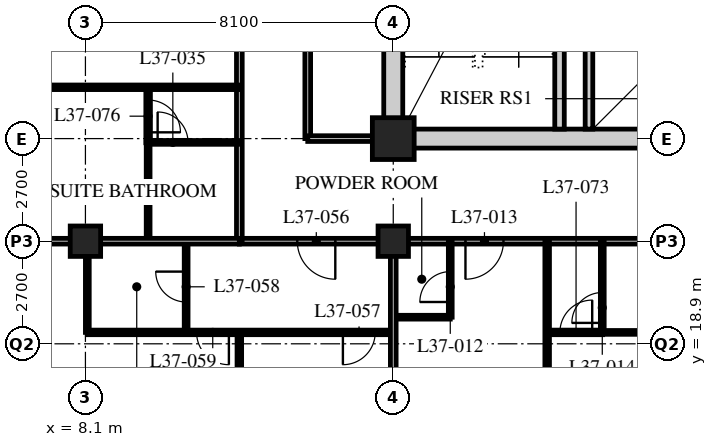
"""IFC4 building model, lengths in metres.
Left out: names, types, materials, properties, quantities, classifications, styles, units other than length and angle.
Written with IfcOpenShell. Run it as: python <this file> out.ifc"""

import sys

from ifc_helpers import new_model, si_unit, direction, frame, frame_2d, origin, origin_2d, place, context, subcontext, project, spatial, rectangle, hollow_rectangle, extrude, element, fill, save


model = new_model("IFC4")
c1 = context("Model", 3, precision=1e-05, world=origin(), true_north=direction((0.0, 1.0)))
c2 = subcontext(c1, "Body", "Model", "MODEL_VIEW")
j1 = project(units=[si_unit("LENGTHUNIT", "METRE"), si_unit("PLANEANGLEUNIT", "RADIAN")], contexts=[c1])
p1 = place(None, origin())
s1 = spatial("IfcSite", under=j1, at=p1, CompositionType="ELEMENT")
p2 = place(p1, origin())
s2 = spatial("IfcBuilding", under=s1, at=p2, CompositionType="ELEMENT")
p3 = place(p2, frame((0.0, 0.0, 144.2)))
s3 = spatial("IfcBuildingStorey", under=s2, at=p3, CompositionType="ELEMENT", Elevation=144.2)
for number, where, z_axis, x_axis in (
    (1, (8.1, 21.6, 0.0), (0.0, 0.0, 1.0), (1.0, 0.0, 0.0)),
    (2, (16.2, 21.6, 0.0), (0.0, 0.0, 1.0), (1.0, 0.0, 0.0)),
):
    element("IfcColumn", number, at=place(p3, frame(where, z_axis=z_axis, x_axis=x_axis)), inside=s3, PredefinedType="COLUMN", context=c2, shape_type="SweptSolid", body=[
        extrude(hollow_rectangle(XDim=0.8, YDim=0.8, WallThickness=0.08, at=origin_2d()), origin(), (0.0, 0.0, 1.0), 3.4),
    ])
p4 = place(p3, frame((16.2, 24.3, 0.0), z_axis=(0.0, 0.0, 1.0), x_axis=(1.0, 0.0, 0.0)))
e3 = element("IfcColumn", 3, at=p4, inside=s3, PredefinedType="COLUMN", context=c2, shape_type="SweptSolid", body=[
    extrude(hollow_rectangle(XDim=1.1, YDim=1.1, WallThickness=0.1, at=origin_2d()), origin(), (0.0, 0.0, 1.0), 3.4),
])
p5 = place(p3, frame((12.15, 21.6, 0.0), z_axis=(0.0, 0.0, 1.0), x_axis=(1.0, 0.0, 0.0)))
e4 = element("IfcWall", 4, at=p5, inside=s3, PredefinedType="PARTITIONING", context=c2, shape_type="SweptSolid", body=[
    extrude(rectangle(XDim=36.45, YDim=0.15, at=frame_2d((18.225, 0.0))), origin(), (0.0, 0.0, 1.0), 2.42),
])
p6 = place(p5, frame((5.95, 0.0, 0.0)))
e5 = element("IfcOpeningElement", 5, at=p6, cuts=e4, PredefinedType="OPENING", context=c2, shape_type="SweptSolid", body=[
    extrude(rectangle(XDim=1.0, YDim=2.1, at=frame_2d((0.5, 1.05))), frame((0.0, 0.085, 0.0), z_axis=(0.0, -1.0, 0.0), x_axis=(1.0, 0.0, 0.0)), (0.0, 0.0, 1.0), 0.17),
])
p7 = place(p5, frame((14.05, 0.0, 0.0)))
e6 = element("IfcOpeningElement", 6, at=p7, cuts=e4, PredefinedType="OPENING", context=c2, shape_type="SweptSolid", body=[
    extrude(rectangle(XDim=1.0, YDim=2.1, at=frame_2d((0.5, 1.05))), frame((0.0, 0.085, 0.0), z_axis=(0.0, -1.0, 0.0), x_axis=(1.0, 0.0, 0.0)), (0.0, 0.0, 1.0), 0.17),
])
p8 = place(p5, frame((22.15, 0.0, 0.0)))
e7 = element("IfcOpeningElement", 7, at=p8, cuts=e4, PredefinedType="OPENING", context=c2, shape_type="SweptSolid", body=[
    extrude(rectangle(XDim=1.0, YDim=2.1, at=frame_2d((0.5, 1.05))), frame((0.0, 0.085, 0.0), z_axis=(0.0, -1.0, 0.0), x_axis=(1.0, 0.0, 0.0)), (0.0, 0.0, 1.0), 0.17),
])
p9 = place(p5, frame((30.8, 0.0, 0.0)))
e8 = element("IfcOpeningElement", 8, at=p9, cuts=e4, PredefinedType="OPENING", context=c2, shape_type="SweptSolid", body=[
    extrude(rectangle(XDim=1.0, YDim=2.1, at=frame_2d((0.5, 1.05))), frame((0.0, 0.085, 0.0), z_axis=(0.0, -1.0, 0.0), x_axis=(1.0, 0.0, 0.0)), (0.0, 0.0, 1.0), 0.17),
])
p10 = place(p5, frame((1.525, 0.0, 0.0)))
e9 = element("IfcOpeningElement", 9, at=p10, cuts=e4, PredefinedType="OPENING", context=c2, shape_type="SweptSolid", body=[
    extrude(rectangle(XDim=1.0, YDim=2.1, at=frame_2d((0.5, 1.05))), frame((0.0, 0.085, 0.0), z_axis=(0.0, -1.0, 0.0), x_axis=(1.0, 0.0, 0.0)), (0.0, 0.0, 1.0), 0.17),
])
p11 = place(p5, frame((33.925, 0.0, 0.0)))
e10 = element("IfcOpeningElement", 10, at=p11, cuts=e4, PredefinedType="OPENING", context=c2, shape_type="SweptSolid", body=[
    extrude(rectangle(XDim=1.0, YDim=2.1, at=frame_2d((0.5, 1.05))), frame((0.0, 0.085, 0.0), z_axis=(0.0, -1.0, 0.0), x_axis=(1.0, 0.0, 0.0)), (0.0, 0.0, 1.0), 0.17),
])
p12 = place(p3, frame((12.15, 21.6, 0.0), z_axis=(0.0, 0.0, 1.0), x_axis=(0.0, 1.0, 0.0)))
e11 = element("IfcWall", 11, at=p12, inside=s3, PredefinedType="PARTITIONING", context=c2, shape_type="SweptSolid", body=[
    extrude(rectangle(XDim=24.3, YDim=0.15, at=frame_2d((12.15, 0.0))), origin(), (0.0, 0.0, 1.0), 3.19),
])
p13 = place(p12, frame((5.575, 0.0, 0.0)))
e12 = element("IfcOpeningElement", 12, at=p13, cuts=e11, PredefinedType="OPENING", context=c2, shape_type="SweptSolid", body=[
    extrude(rectangle(XDim=1.0, YDim=2.1, at=frame_2d((0.5, 1.05))), frame((0.0, 0.085, 0.0), z_axis=(0.0, -1.0, 0.0), x_axis=(1.0, 0.0, 0.0)), (0.0, 0.0, 1.0), 0.17),
])
p14 = place(p12, frame((14.05, 0.0, 0.0)))
e13 = element("IfcOpeningElement", 13, at=p14, cuts=e11, PredefinedType="OPENING", context=c2, shape_type="SweptSolid", body=[
    extrude(rectangle(XDim=1.0, YDim=2.1, at=frame_2d((0.5, 1.05))), frame((0.0, 0.085, 0.0), z_axis=(0.0, -1.0, 0.0), x_axis=(1.0, 0.0, 0.0)), (0.0, 0.0, 1.0), 0.17),
])
p15 = place(p12, frame((22.7, 0.0, 0.0)))
e14 = element("IfcOpeningElement", 14, at=p15, cuts=e11, PredefinedType="OPENING", context=c2, shape_type="SweptSolid", body=[
    extrude(rectangle(XDim=1.0, YDim=2.1, at=frame_2d((0.5, 1.05))), frame((0.0, 0.085, 0.0), z_axis=(0.0, -1.0, 0.0), x_axis=(1.0, 0.0, 0.0)), (0.0, 0.0, 1.0), 0.17),
])
p16 = place(p3, frame((13.95, 44.1, 0.0), z_axis=(0.0, 0.0, 1.0), x_axis=(0.0, -1.0, 0.0)))
e15 = element("IfcWall", 15, at=p16, inside=s3, PredefinedType="PARTITIONING", context=c2, shape_type="SweptSolid", body=[
    extrude(rectangle(XDim=19.8, YDim=0.15, at=frame_2d((9.9, 0.0))), origin(), (0.0, 0.0, 1.0), 3.19),
])
p17 = place(p16, frame((15.25, 0.0, 0.0)))
e16 = element("IfcOpeningElement", 16, at=p17, cuts=e15, PredefinedType="OPENING", context=c2, shape_type="SweptSolid", body=[
    extrude(rectangle(XDim=1.0, YDim=2.1, at=frame_2d((0.5, 1.05))), frame((0.0, 0.085, 0.0), z_axis=(0.0, -1.0, 0.0), x_axis=(1.0, 0.0, 0.0)), (0.0, 0.0, 1.0), 0.17),
])
p18 = place(p16, frame((7.15, 0.0, 0.0)))
e17 = element("IfcOpeningElement", 17, at=p18, cuts=e15, PredefinedType="OPENING", context=c2, shape_type="SweptSolid", body=[
    extrude(rectangle(XDim=1.0, YDim=2.1, at=frame_2d((0.5, 1.05))), frame((0.0, 0.085, 0.0), z_axis=(0.0, -1.0, 0.0), x_axis=(1.0, 0.0, 0.0)), (0.0, 0.0, 1.0), 0.17),
])
p19 = place(p3, frame((13.95, 24.3, 0.0), z_axis=(0.0, 0.0, 1.0), x_axis=(1.0, 0.0, 0.0)))
e18 = element("IfcWall", 18, at=p19, inside=s3, PredefinedType="PARTITIONING", context=c2, shape_type="SweptSolid", body=[
    extrude(rectangle(XDim=2.05, YDim=0.15, at=frame_2d((1.025, 0.0))), origin(), (0.0, 0.0, 1.0), 3.19),
])
p20 = place(p3, frame((16.2, 19.6, 0.0), z_axis=(0.0, 0.0, 1.0), x_axis=(1.0, 0.0, 0.0)))
e19 = element("IfcWall", 19, at=p20, inside=s3, PredefinedType="PARTITIONING", context=c2, shape_type="SweptSolid", body=[
    extrude(rectangle(XDim=1.5, YDim=0.1, at=frame_2d((0.75, 0.0))), origin(), (0.0, 0.0, 1.0), 3.19),
])
p21 = place(p3, frame((17.7, 21.6, 0.0), z_axis=(0.0, 0.0, 1.0), x_axis=(0.0, -1.0, 0.0)))
e20 = element("IfcWall", 20, at=p21, inside=s3, PredefinedType="PARTITIONING", context=c2, shape_type="SweptSolid", body=[
    extrude(rectangle(XDim=2.0, YDim=0.1, at=frame_2d((1.0, 0.0))), origin(), (0.0, 0.0, 1.0), 3.19),
])
p22 = place(p21, frame((0.8, 0.0, 0.0)))
e21 = element("IfcOpeningElement", 21, at=p22, cuts=e20, PredefinedType="OPENING", context=c2, shape_type="SweptSolid", body=[
    extrude(rectangle(XDim=0.8, YDim=2.1, at=frame_2d((0.4, 1.05))), frame((0.0, 0.06, 0.0), z_axis=(0.0, -1.0, 0.0), x_axis=(1.0, 0.0, 0.0)), (0.0, 0.0, 1.0), 0.12),
])
p23 = place(p3, frame((21.7, 19.2, 0.0), z_axis=(0.0, 0.0, 1.0), x_axis=(1.0, 0.0, 0.0)))
e22 = element("IfcWall", 22, at=p23, inside=s3, PredefinedType="PARTITIONING", context=c2, shape_type="SweptSolid", body=[
    extrude(rectangle(XDim=2.6, YDim=0.1, at=frame_2d((1.3, 0.0))), origin(), (0.0, 0.0, 1.0), 3.19),
])
p24 = place(p3, frame((21.7, 21.6, 0.0), z_axis=(0.0, 0.0, 1.0), x_axis=(0.0, -1.0, 0.0)))
e23 = element("IfcWall", 23, at=p24, inside=s3, PredefinedType="PARTITIONING", context=c2, shape_type="SweptSolid", body=[
    extrude(rectangle(XDim=2.4, YDim=0.1, at=frame_2d((1.2, 0.0))), origin(), (0.0, 0.0, 1.0), 3.19),
])
p25 = place(p24, frame((1.35, 0.0, 0.0)))
e24 = element("IfcOpeningElement", 24, at=p25, cuts=e23, PredefinedType="OPENING", context=c2, shape_type="SweptSolid", body=[
    extrude(rectangle(XDim=0.8, YDim=2.1, at=frame_2d((0.4, 1.05))), frame((0.0, 0.06, 0.0), z_axis=(0.0, -1.0, 0.0), x_axis=(1.0, 0.0, 0.0)), (0.0, 0.0, 1.0), 0.12),
])
p26 = place(p3, frame((20.25, 21.6, 0.0), z_axis=(0.0, 0.0, 1.0), x_axis=(0.0, -1.0, 0.0)))
e25 = element("IfcWall", 25, at=p26, inside=s3, PredefinedType="PARTITIONING", context=c2, shape_type="SweptSolid", body=[
    extrude(rectangle(XDim=15.9, YDim=0.12, at=frame_2d((7.95, 0.0))), origin(), (0.0, 0.0, 1.0), 3.19),
])
p27 = place(p26, frame((8.875, 0.0, 0.0)))
e26 = element("IfcOpeningElement", 26, at=p27, cuts=e25, PredefinedType="OPENING", context=c2, shape_type="SweptSolid", body=[
    extrude(rectangle(XDim=0.85, YDim=2.1, at=frame_2d((0.425, 1.05))), frame((0.0, 0.07, 0.0), z_axis=(0.0, -1.0, 0.0), x_axis=(1.0, 0.0, 0.0)), (0.0, 0.0, 1.0), 0.14),
])
p28 = place(p3, frame((9.75, 21.6, 0.0), z_axis=(0.0, 0.0, 1.0), x_axis=(0.0, 1.0, 0.0)))
e27 = element("IfcWall", 27, at=p28, inside=s3, PredefinedType="PARTITIONING", context=c2, shape_type="SweptSolid", body=[
    extrude(rectangle(XDim=2.6, YDim=0.1, at=frame_2d((1.3, 0.0))), origin(), (0.0, 0.0, 1.0), 3.19),
])
p29 = place(p3, frame((12.15, 24.2, 0.0), z_axis=(0.0, 0.0, 1.0), x_axis=(-1.0, 0.0, 0.0)))
e28 = element("IfcWall", 28, at=p29, inside=s3, PredefinedType="PARTITIONING", context=c2, shape_type="SweptSolid", body=[
    extrude(rectangle(XDim=2.4, YDim=0.1, at=frame_2d((1.2, 0.0))), origin(), (0.0, 0.0, 1.0), 3.19),
])
p30 = place(p29, frame((1.35, 0.0, 0.0)))
e29 = element("IfcOpeningElement", 29, at=p30, cuts=e28, PredefinedType="OPENING", context=c2, shape_type="SweptSolid", body=[
    extrude(rectangle(XDim=0.8, YDim=2.1, at=frame_2d((0.4, 1.05))), frame((0.0, 0.06, 0.0), z_axis=(0.0, -1.0, 0.0), x_axis=(1.0, 0.0, 0.0)), (0.0, 0.0, 1.0), 0.12),
])
p31 = place(p3, frame((12.15, 25.65, 0.0), z_axis=(0.0, 0.0, 1.0), x_axis=(-1.0, 0.0, 0.0)))
e30 = element("IfcWall", 30, at=p31, inside=s3, PredefinedType="PARTITIONING", context=c2, shape_type="SweptSolid", body=[
    extrude(rectangle(XDim=11.85, YDim=0.12, at=frame_2d((5.925, 0.0))), origin(), (0.0, 0.0, 1.0), 3.19),
])
p32 = place(p31, frame((6.85, 0.0, 0.0)))
e31 = element("IfcOpeningElement", 31, at=p32, cuts=e30, PredefinedType="OPENING", context=c2, shape_type="SweptSolid", body=[
    extrude(rectangle(XDim=0.85, YDim=2.1, at=frame_2d((0.425, 1.05))), frame((0.0, 0.07, 0.0), z_axis=(0.0, -1.0, 0.0), x_axis=(1.0, 0.0, 0.0)), (0.0, 0.0, 1.0), 0.14),
])
p33 = place(p3, frame((10.75, 21.6, 0.0), z_axis=(0.0, 0.0, 1.0), x_axis=(0.0, -1.0, 0.0)))
e32 = element("IfcWall", 32, at=p33, inside=s3, PredefinedType="PARTITIONING", context=c2, shape_type="SweptSolid", body=[
    extrude(rectangle(XDim=2.4, YDim=0.1, at=frame_2d((1.2, 0.0))), origin(), (0.0, 0.0, 1.0), 3.19),
])
p34 = place(p33, frame((0.8, 0.0, 0.0)))
e33 = element("IfcOpeningElement", 33, at=p34, cuts=e32, PredefinedType="OPENING", context=c2, shape_type="SweptSolid", body=[
    extrude(rectangle(XDim=0.8, YDim=2.1, at=frame_2d((0.4, 1.05))), frame((0.0, 0.06, 0.0), z_axis=(0.0, -1.0, 0.0), x_axis=(1.0, 0.0, 0.0)), (0.0, 0.0, 1.0), 0.12),
])
p35 = place(p3, frame((8.15, 21.6, 0.0), z_axis=(0.0, 0.0, 1.0), x_axis=(0.0, -1.0, 0.0)))
e34 = element("IfcWall", 34, at=p35, inside=s3, PredefinedType="PARTITIONING", context=c2, shape_type="SweptSolid", body=[
    extrude(rectangle(XDim=2.4, YDim=0.1, at=frame_2d((1.2, 0.0))), origin(), (0.0, 0.0, 1.0), 2.42),
])
p36 = place(p3, frame((8.15, 19.2, 0.0), z_axis=(0.0, 0.0, 1.0), x_axis=(1.0, 0.0, 0.0)))
e35 = element("IfcWall", 35, at=p36, inside=s3, PredefinedType="PARTITIONING", context=c2, shape_type="SweptSolid", body=[
    extrude(rectangle(XDim=8.05, YDim=0.12, at=frame_2d((4.025, 0.0))), origin(), (0.0, 0.0, 1.0), 3.19),
])
p37 = place(p36, frame((6.725, 0.0, 0.0)))
e36 = element("IfcOpeningElement", 36, at=p37, cuts=e35, PredefinedType="OPENING", context=c2, shape_type="SweptSolid", body=[
    extrude(rectangle(XDim=0.85, YDim=2.1, at=frame_2d((0.425, 1.05))), frame((0.0, 0.07, 0.0), z_axis=(0.0, -1.0, 0.0), x_axis=(1.0, 0.0, 0.0)), (0.0, 0.0, 1.0), 0.14),
])
p38 = place(p36, frame((2.875, 0.0, 0.0)))
e37 = element("IfcOpeningElement", 37, at=p38, cuts=e35, PredefinedType="OPENING", context=c2, shape_type="SweptSolid", body=[
    extrude(rectangle(XDim=0.85, YDim=2.1, at=frame_2d((0.425, 1.05))), frame((0.0, 0.07, 0.0), z_axis=(0.0, -1.0, 0.0), x_axis=(1.0, 0.0, 0.0)), (0.0, 0.0, 1.0), 0.14),
])
p39 = place(p3, frame((12.15, 19.2, 0.0), z_axis=(0.0, 0.0, 1.0), x_axis=(0.0, -1.0, 0.0)))
e38 = element("IfcWall", 38, at=p39, inside=s3, PredefinedType="PARTITIONING", context=c2, shape_type="SweptSolid", body=[
    extrude(rectangle(XDim=13.5, YDim=0.12, at=frame_2d((6.75, 0.0))), origin(), (0.0, 0.0, 1.0), 3.19),
])
p40 = place(p3, frame((0.3, 21.6, 0.0), z_axis=(0.0, 0.0, 1.0), x_axis=(1.0, 0.0, 0.0)))
e39 = element("IfcWall", 39, at=p40, inside=s3, PredefinedType="PARTITIONING", context=c2, shape_type="SweptSolid", body=[
    extrude(rectangle(XDim=11.85, YDim=0.15, at=frame_2d((5.925, 0.0))), origin(), (0.0, 0.0, 1.0), 2.42),
])
p41 = place(p3, frame((16.2, 21.6, 0.0), z_axis=(0.0, 0.0, 1.0), x_axis=(0.0, -1.0, 0.0)))
e40 = element("IfcWall", 40, at=p41, inside=s3, PredefinedType="PARTITIONING", context=c2, shape_type="SweptSolid", body=[
    extrude(rectangle(XDim=15.9, YDim=0.15, at=frame_2d((7.95, 0.0))), origin(), (0.0, 0.0, 1.0), 2.42),
])
p42 = place(p3, frame((21.71, 19.2, 0.0), z_axis=(0.0, 0.0, 1.0), x_axis=(-1.0, 0.0, 0.0)))
e41 = element("IfcWall", 41, at=p42, inside=s3, PredefinedType="PARTITIONING", context=c2, shape_type="SweptSolid", body=[
    extrude(rectangle(XDim=1.46, YDim=0.12, at=frame_2d((0.73, 0.0))), origin(), (0.0, 0.0, 1.0), 3.19),
])
p43 = place(p42, frame((0.275, 0.0, 0.0)))
e42 = element("IfcOpeningElement", 42, at=p43, cuts=e41, PredefinedType="OPENING", context=c2, shape_type="SweptSolid", body=[
    extrude(rectangle(XDim=0.85, YDim=2.1, at=frame_2d((0.425, 1.05))), frame((0.0, 0.07, 0.0), z_axis=(0.0, -1.0, 0.0), x_axis=(1.0, 0.0, 0.0)), (0.0, 0.0, 1.0), 0.14),
])
p44 = place(p3, frame((9.75, 24.19, 0.0), z_axis=(0.0, 0.0, 1.0), x_axis=(0.0, 1.0, 0.0)))
e43 = element("IfcWall", 43, at=p44, inside=s3, PredefinedType="PARTITIONING", context=c2, shape_type="SweptSolid", body=[
    extrude(rectangle(XDim=1.46, YDim=0.12, at=frame_2d((0.73, 0.0))), origin(), (0.0, 0.0, 1.0), 3.19),
])
p45 = place(p44, frame((0.275, 0.0, 0.0)))
e44 = element("IfcOpeningElement", 44, at=p45, cuts=e43, PredefinedType="OPENING", context=c2, shape_type="SweptSolid", body=[
    extrude(rectangle(XDim=0.85, YDim=2.1, at=frame_2d((0.425, 1.05))), frame((0.0, 0.07, 0.0), z_axis=(0.0, -1.0, 0.0), x_axis=(1.0, 0.0, 0.0)), (0.0, 0.0, 1.0), 0.14),
])
p46 = place(p3, frame((15.95, 24.3, 0.0), z_axis=(0.0, 0.0, 1.0), x_axis=(1.0, 0.0, 0.0)))
e45 = element("IfcWall", 45, at=p46, inside=s3, PredefinedType="SOLIDWALL", context=c2, shape_type="SweptSolid", body=[
    extrude(rectangle(XDim=24.8, YDim=0.5, at=frame_2d((12.4, 0.0))), origin(), (0.0, 0.0, 1.0), 2.42),
])
p47 = place(p46, frame((11.5, 0.0, 0.0)))
e46 = element("IfcOpeningElement", 46, at=p47, cuts=e45, PredefinedType="OPENING", context=c2, shape_type="SweptSolid", body=[
    extrude(rectangle(XDim=1.8, YDim=2.4, at=frame_2d((0.9, 1.2))), frame((0.0, 0.26, 0.0), z_axis=(0.0, -1.0, 0.0), x_axis=(1.0, 0.0, 0.0)), (0.0, 0.0, 1.0), 0.52),
])
p48 = place(p3, frame((16.2, 24.55, 0.0), z_axis=(0.0, 0.0, 1.0), x_axis=(0.0, 1.0, 0.0)))
e47 = element("IfcWall", 47, at=p48, inside=s3, PredefinedType="SOLIDWALL", context=c2, shape_type="SweptSolid", body=[
    extrude(rectangle(XDim=15.7, YDim=0.5, at=frame_2d((7.85, 0.0))), origin(), (0.0, 0.0, 1.0), 2.42),
])
p49 = place(p3, frame((20.575, 24.55, 0.0), z_axis=(0.0, 0.0, 1.0), x_axis=(0.0, 1.0, 0.0)))
e48 = element("IfcWall", 48, at=p49, inside=s3, PredefinedType="SOLIDWALL", context=c2, shape_type="SweptSolid", body=[
    extrude(rectangle(XDim=7.75, YDim=0.25, at=frame_2d((3.875, 0.0))), origin(), (0.0, 0.0, 1.0), 3.19),
])
p50 = place(p49, frame((6.2, 0.0, 0.0)))
e49 = element("IfcOpeningElement", 49, at=p50, cuts=e48, PredefinedType="OPENING", context=c2, shape_type="SweptSolid", body=[
    extrude(rectangle(XDim=1.2, YDim=2.1, at=frame_2d((0.6, 1.05))), frame((0.0, 0.135, 0.0), z_axis=(0.0, -1.0, 0.0), x_axis=(1.0, 0.0, 0.0)), (0.0, 0.0, 1.0), 0.27),
])
p51 = place(p3, frame((21.35, 24.55, 0.0), z_axis=(0.0, 0.0, 1.0), x_axis=(0.0, 1.0, 0.0)))
e50 = element("IfcWall", 50, at=p51, inside=s3, PredefinedType="SOLIDWALL", context=c2, shape_type="SweptSolid", body=[
    extrude(rectangle(XDim=2.6, YDim=0.2, at=frame_2d((1.3, 0.0))), origin(), (0.0, 0.0, 1.0), 3.19),
])
p52 = place(p22, origin())
e51 = element("IfcDoor", 51, at=p52, inside=s3, OperationType="SINGLE_SWING_LEFT", PredefinedType="DOOR", context=c2, shape_type="SweptSolid", body=[
    extrude(rectangle(XDim=0.8, YDim=2.1, at=frame_2d((0.4, 1.05))), frame((0.0, 0.025, 0.0), z_axis=(0.0, -1.0, 0.0), x_axis=(1.0, 0.0, 0.0)), (0.0, 0.0, 1.0), 0.05),
])
fill(e21, e51)
p53 = place(p6, origin())
e52 = element("IfcDoor", 52, at=p53, inside=s3, OperationType="SINGLE_SWING_RIGHT", PredefinedType="DOOR", context=c2, shape_type="SweptSolid", body=[
    extrude(rectangle(XDim=1.0, YDim=2.1, at=frame_2d((0.5, 1.05))), frame((0.0, 0.025, 0.0), z_axis=(0.0, -1.0, 0.0), x_axis=(1.0, 0.0, 0.0)), (0.0, 0.0, 1.0), 0.05),
])
fill(e5, e52)
p54 = place(p25, origin())
e53 = element("IfcDoor", 53, at=p54, inside=s3, OperationType="SINGLE_SWING_LEFT", PredefinedType="DOOR", context=c2, shape_type="SweptSolid", body=[
    extrude(rectangle(XDim=0.8, YDim=2.1, at=frame_2d((0.4, 1.05))), frame((0.0, 0.025, 0.0), z_axis=(0.0, -1.0, 0.0), x_axis=(1.0, 0.0, 0.0)), (0.0, 0.0, 1.0), 0.05),
])
fill(e24, e53)
p55 = place(p30, origin())
e54 = element("IfcDoor", 54, at=p55, inside=s3, OperationType="SINGLE_SWING_LEFT", PredefinedType="DOOR", context=c2, shape_type="SweptSolid", body=[
    extrude(rectangle(XDim=0.8, YDim=2.1, at=frame_2d((0.4, 1.05))), frame((0.0, 0.025, 0.0), z_axis=(0.0, -1.0, 0.0), x_axis=(1.0, 0.0, 0.0)), (0.0, 0.0, 1.0), 0.05),
])
fill(e29, e54)
p56 = place(p10, origin())
e55 = element("IfcDoor", 55, at=p56, inside=s3, OperationType="SINGLE_SWING_LEFT", PredefinedType="DOOR", context=c2, shape_type="SweptSolid", body=[
    extrude(rectangle(XDim=1.0, YDim=2.1, at=frame_2d((0.5, 1.05))), frame((0.0, 0.025, 0.0), z_axis=(0.0, -1.0, 0.0), x_axis=(1.0, 0.0, 0.0)), (0.0, 0.0, 1.0), 0.05),
])
fill(e9, e55)
p57 = place(p37, origin())
e56 = element("IfcDoor", 56, at=p57, inside=s3, OperationType="SINGLE_SWING_RIGHT", PredefinedType="DOOR", context=c2, shape_type="SweptSolid", body=[
    extrude(rectangle(XDim=0.85, YDim=2.1, at=frame_2d((0.425, 1.05))), frame((0.0, 0.025, 0.0), z_axis=(0.0, -1.0, 0.0), x_axis=(1.0, 0.0, 0.0)), (0.0, 0.0, 1.0), 0.05),
])
fill(e36, e56)
p58 = place(p34, origin())
e57 = element("IfcDoor", 57, at=p58, inside=s3, OperationType="SINGLE_SWING_RIGHT", PredefinedType="DOOR", context=c2, shape_type="SweptSolid", body=[
    extrude(rectangle(XDim=0.8, YDim=2.1, at=frame_2d((0.4, 1.05))), frame((0.0, 0.025, 0.0), z_axis=(0.0, -1.0, 0.0), x_axis=(1.0, 0.0, 0.0)), (0.0, 0.0, 1.0), 0.05),
])
fill(e33, e57)
p59 = place(p38, origin())
e58 = element("IfcDoor", 58, at=p59, inside=s3, OperationType="SINGLE_SWING_LEFT", PredefinedType="DOOR", context=c2, shape_type="SweptSolid", body=[
    extrude(rectangle(XDim=0.85, YDim=2.1, at=frame_2d((0.425, 1.05))), frame((0.0, 0.025, 0.0), z_axis=(0.0, -1.0, 0.0), x_axis=(1.0, 0.0, 0.0)), (0.0, 0.0, 1.0), 0.05),
])
fill(e37, e58)
p60 = place(p43, origin())
e59 = element("IfcDoor", 59, at=p60, inside=s3, OperationType="SINGLE_SWING_RIGHT", PredefinedType="DOOR", context=c2, shape_type="SweptSolid", body=[
    extrude(rectangle(XDim=0.85, YDim=2.1, at=frame_2d((0.425, 1.05))), frame((0.0, 0.025, 0.0), z_axis=(0.0, -1.0, 0.0), x_axis=(1.0, 0.0, 0.0)), (0.0, 0.0, 1.0), 0.05),
])
fill(e42, e59)
p61 = place(p45, origin())
e60 = element("IfcDoor", 60, at=p61, inside=s3, OperationType="SINGLE_SWING_RIGHT", PredefinedType="DOOR", context=c2, shape_type="SweptSolid", body=[
    extrude(rectangle(XDim=0.85, YDim=2.1, at=frame_2d((0.425, 1.05))), frame((0.0, 0.025, 0.0), z_axis=(0.0, -1.0, 0.0), x_axis=(1.0, 0.0, 0.0)), (0.0, 0.0, 1.0), 0.05),
])
fill(e44, e60)
save(model, sys.argv[1])
